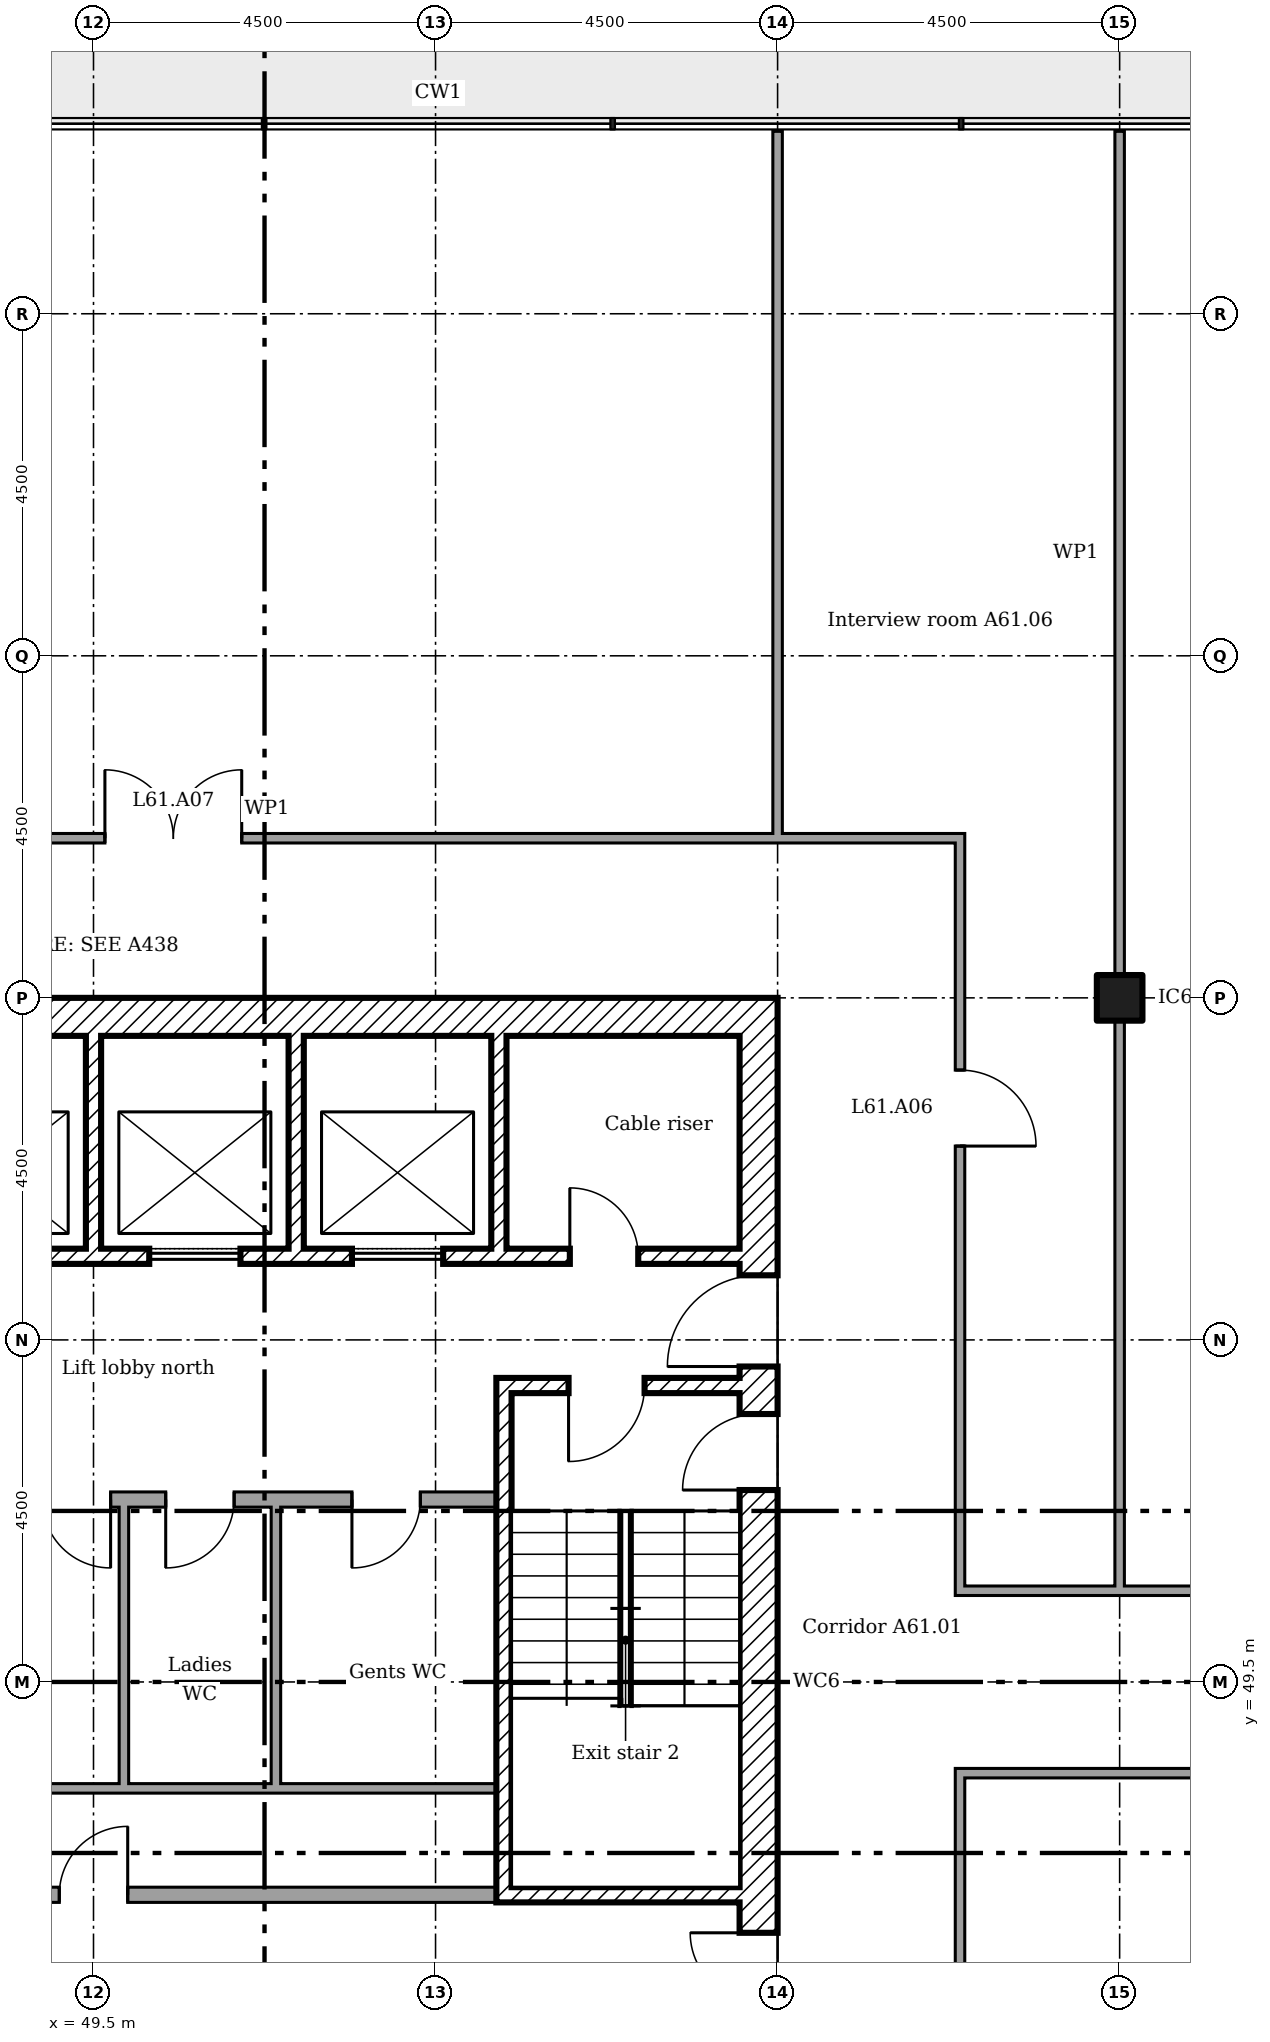
"""IFC4 building model, lengths in metres.
Left out: names, types, materials, properties, quantities, classifications, styles, units other than length and angle.
Written with IfcOpenShell. Run it as: python <this file> out.ifc"""

import sys

from ifc_helpers import new_model, si_unit, direction, frame, frame_2d, origin, origin_2d, place, context, subcontext, project, spatial, rectangle, extrude, element, fill, save


model = new_model("IFC4")
c1 = context("Model", 3, precision=1e-05, world=origin(), true_north=direction((0.0, 1.0)))
c2 = subcontext(c1, "Body", "Model", "MODEL_VIEW")
j1 = project(units=[si_unit("LENGTHUNIT", "METRE"), si_unit("PLANEANGLEUNIT", "RADIAN")], contexts=[c1])
p1 = place(None, origin())
s1 = spatial("IfcSite", under=j1, at=p1, CompositionType="ELEMENT")
p2 = place(p1, origin())
s2 = spatial("IfcBuilding", under=s1, at=p2, CompositionType="ELEMENT")
p3 = place(p2, frame((0.0, 0.0, 238.8)))
s3 = spatial("IfcBuildingStorey", under=s2, at=p3, CompositionType="ELEMENT", Elevation=238.8)
p4 = place(p3, frame((63.0, 58.5, 0.0)))
e1 = element("IfcColumn", 1, at=p4, inside=s3, PredefinedType="COLUMN", context=c2, shape_type="SweptSolid", body=[
    extrude(rectangle(XDim=0.6, YDim=0.6, at=origin_2d()), origin(), (0.0, 0.0, 1.0), 3.6),
])
p5 = place(p3, frame((58.25, 40.5, 0.0), z_axis=(0.0, 0.0, 1.0), x_axis=(0.0, 1.0, 0.0)))
e2 = element("IfcWall", 2, at=p5, inside=s3, PredefinedType="SHEAR", context=c2, shape_type="SweptSolid", body=[
    extrude(rectangle(XDim=18.0, YDim=0.5, at=frame_2d((9.0, 0.0))), origin(), (0.0, 0.0, 1.0), 3.35),
])
p6 = place(p5, frame((13.15, 0.0, 0.0)))
e3 = element("IfcOpeningElement", 3, at=p6, cuts=e2, PredefinedType="OPENING", context=c2, shape_type="SweptSolid", body=[
    extrude(rectangle(XDim=1.2, YDim=2.1, at=frame_2d((0.6, 1.05))), frame((0.0, 0.26, 0.0), z_axis=(0.0, -1.0, 0.0), x_axis=(1.0, 0.0, 0.0)), (0.0, 0.0, 1.0), 0.52),
])
p7 = place(p5, frame((3.9, 0.0, 0.0)))
e4 = element("IfcOpeningElement", 4, at=p7, cuts=e2, PredefinedType="OPENING", context=c2, shape_type="SweptSolid", body=[
    extrude(rectangle(XDim=1.8, YDim=2.1, at=frame_2d((0.9, 1.05))), frame((0.0, 0.26, 0.0), z_axis=(0.0, -1.0, 0.0), x_axis=(1.0, 0.0, 0.0)), (0.0, 0.0, 1.0), 0.52),
])
p8 = place(p5, frame((11.525, 0.0, 0.0)))
e5 = element("IfcOpeningElement", 5, at=p8, cuts=e2, PredefinedType="OPENING", context=c2, shape_type="SweptSolid", body=[
    extrude(rectangle(XDim=1.0, YDim=2.1, at=frame_2d((0.5, 1.05))), frame((0.0, 0.26, 0.0), z_axis=(0.0, -1.0, 0.0), x_axis=(1.0, 0.0, 0.0)), (0.0, 0.0, 1.0), 0.52),
])
p9 = place(p3, frame((40.5, 58.25, 0.0)))
e6 = element("IfcWall", 6, at=p9, inside=s3, PredefinedType="SHEAR", context=c2, shape_type="SweptSolid", body=[
    extrude(rectangle(XDim=17.5, YDim=0.5, at=frame_2d((8.75, 0.0))), origin(), (0.0, 0.0, 1.0), 3.35),
])
for number, where, z_axis, x_axis in (
    (7, (49.5, 58.0, 0.0), (0.0, 0.0, 1.0), (0.0, -1.0, 0.0)),
    (8, (52.167, 58.0, 0.0), (0.0, 0.0, 1.0), (0.0, -1.0, 0.0)),
    (9, (54.833, 58.0, 0.0), (0.0, 0.0, 1.0), (0.0, -1.0, 0.0)),
):
    element("IfcWall", number, at=place(p3, frame(where, z_axis=z_axis, x_axis=x_axis)), inside=s3, PredefinedType="SHEAR", context=c2, shape_type="SweptSolid", body=[
        extrude(rectangle(XDim=2.8, YDim=0.2, at=frame_2d((1.4, 0.0))), origin(), (0.0, 0.0, 1.0), 3.35),
    ])
p10 = place(p3, frame((46.933, 55.1, 0.0)))
e10 = element("IfcWall", 10, at=p10, inside=s3, PredefinedType="SHEAR", context=c2, shape_type="SweptSolid", body=[
    extrude(rectangle(XDim=11.067, YDim=0.2, at=frame_2d((5.533, 0.0))), origin(), (0.0, 0.0, 1.0), 3.35),
])
p11 = place(p10, frame((8.833, 0.0, 0.0)))
e11 = element("IfcOpeningElement", 11, at=p11, cuts=e10, PredefinedType="OPENING", context=c2, shape_type="SweptSolid", body=[
    extrude(rectangle(XDim=0.9, YDim=2.1, at=frame_2d((0.45, 1.05))), frame((0.0, 0.11, 0.0), z_axis=(0.0, -1.0, 0.0), x_axis=(1.0, 0.0, 0.0)), (0.0, 0.0, 1.0), 0.22),
])
p12 = place(p10, frame((0.633, 0.0, 0.0)))
e12 = element("IfcOpeningElement", 12, at=p12, cuts=e10, PredefinedType="OPENING", context=c2, shape_type="SweptSolid", body=[
    extrude(rectangle(XDim=1.2, YDim=2.1, at=frame_2d((0.6, 1.05))), frame((0.0, 0.11, 0.0), z_axis=(0.0, -1.0, 0.0), x_axis=(1.0, 0.0, 0.0)), (0.0, 0.0, 1.0), 0.22),
])
p13 = place(p10, frame((3.3, 0.0, 0.0)))
e13 = element("IfcOpeningElement", 13, at=p13, cuts=e10, PredefinedType="OPENING", context=c2, shape_type="SweptSolid", body=[
    extrude(rectangle(XDim=1.2, YDim=2.1, at=frame_2d((0.6, 1.05))), frame((0.0, 0.11, 0.0), z_axis=(0.0, -1.0, 0.0), x_axis=(1.0, 0.0, 0.0)), (0.0, 0.0, 1.0), 0.22),
])
p14 = place(p10, frame((5.967, 0.0, 0.0)))
e14 = element("IfcOpeningElement", 14, at=p14, cuts=e10, PredefinedType="OPENING", context=c2, shape_type="SweptSolid", body=[
    extrude(rectangle(XDim=1.2, YDim=2.1, at=frame_2d((0.6, 1.05))), frame((0.0, 0.11, 0.0), z_axis=(0.0, -1.0, 0.0), x_axis=(1.0, 0.0, 0.0)), (0.0, 0.0, 1.0), 0.22),
])
p15 = place(p3, frame((54.8, 53.4, 0.0)))
e15 = element("IfcWall", 15, at=p15, inside=s3, PredefinedType="SHEAR", context=c2, shape_type="SweptSolid", body=[
    extrude(rectangle(XDim=3.2, YDim=0.2, at=frame_2d((1.6, 0.0))), origin(), (0.0, 0.0, 1.0), 3.35),
])
p16 = place(p15, frame((0.95, 0.0, 0.0)))
e16 = element("IfcOpeningElement", 16, at=p16, cuts=e15, PredefinedType="OPENING", context=c2, shape_type="SweptSolid", body=[
    extrude(rectangle(XDim=1.0, YDim=2.1, at=frame_2d((0.5, 1.05))), frame((0.0, 0.11, 0.0), z_axis=(0.0, -1.0, 0.0), x_axis=(1.0, 0.0, 0.0)), (0.0, 0.0, 1.0), 0.22),
])
p17 = place(p3, frame((54.8, 46.7, 0.0)))
e17 = element("IfcWall", 17, at=p17, inside=s3, PredefinedType="SHEAR", context=c2, shape_type="SweptSolid", body=[
    extrude(rectangle(XDim=3.2, YDim=0.2, at=frame_2d((1.6, 0.0))), origin(), (0.0, 0.0, 1.0), 3.35),
])
p18 = place(p3, frame((54.9, 46.8, 0.0), z_axis=(0.0, 0.0, 1.0), x_axis=(0.0, 1.0, 0.0)))
e18 = element("IfcWall", 18, at=p18, inside=s3, PredefinedType="SHEAR", context=c2, shape_type="SweptSolid", body=[
    extrude(rectangle(XDim=6.5, YDim=0.2, at=frame_2d((3.25, 0.0))), origin(), (0.0, 0.0, 1.0), 3.35),
])
p19 = place(p3, frame((44.2, 51.9, 0.0)))
e19 = element("IfcWall", 19, at=p19, inside=s3, PredefinedType="PARTITIONING", context=c2, shape_type="SweptSolid", body=[
    extrude(rectangle(XDim=10.6, YDim=0.2, at=frame_2d((5.3, 0.0))), origin(), (0.0, 0.0, 1.0), 3.35),
])
p20 = place(p19, frame((4.625, 0.0, 0.0)))
e20 = element("IfcOpeningElement", 20, at=p20, cuts=e19, PredefinedType="OPENING", context=c2, shape_type="SweptSolid", body=[
    extrude(rectangle(XDim=0.9, YDim=2.1, at=frame_2d((0.45, 1.05))), frame((0.0, 0.11, 0.0), z_axis=(0.0, -1.0, 0.0), x_axis=(1.0, 0.0, 0.0)), (0.0, 0.0, 1.0), 0.22),
])
p21 = place(p19, frame((6.25, 0.0, 0.0)))
e21 = element("IfcOpeningElement", 21, at=p21, cuts=e19, PredefinedType="OPENING", context=c2, shape_type="SweptSolid", body=[
    extrude(rectangle(XDim=0.9, YDim=2.1, at=frame_2d((0.45, 1.05))), frame((0.0, 0.11, 0.0), z_axis=(0.0, -1.0, 0.0), x_axis=(1.0, 0.0, 0.0)), (0.0, 0.0, 1.0), 0.22),
])
p22 = place(p19, frame((8.7, 0.0, 0.0)))
e22 = element("IfcOpeningElement", 22, at=p22, cuts=e19, PredefinedType="OPENING", context=c2, shape_type="SweptSolid", body=[
    extrude(rectangle(XDim=0.9, YDim=2.1, at=frame_2d((0.45, 1.05))), frame((0.0, 0.11, 0.0), z_axis=(0.0, -1.0, 0.0), x_axis=(1.0, 0.0, 0.0)), (0.0, 0.0, 1.0), 0.22),
])
p23 = place(p3, frame((44.2, 46.7, 0.0)))
e23 = element("IfcWall", 23, at=p23, inside=s3, PredefinedType="PARTITIONING", context=c2, shape_type="SweptSolid", body=[
    extrude(rectangle(XDim=10.6, YDim=0.2, at=frame_2d((5.3, 0.0))), origin(), (0.0, 0.0, 1.0), 3.35),
])
p24 = place(p23, frame((4.85, 0.0, 0.0)))
e24 = element("IfcOpeningElement", 24, at=p24, cuts=e23, PredefinedType="OPENING", context=c2, shape_type="SweptSolid", body=[
    extrude(rectangle(XDim=0.9, YDim=2.1, at=frame_2d((0.45, 1.05))), frame((0.0, 0.11, 0.0), z_axis=(0.0, -1.0, 0.0), x_axis=(1.0, 0.0, 0.0)), (0.0, 0.0, 1.0), 0.22),
])
p25 = place(p3, frame((49.962, 48.1, 0.0), z_axis=(0.0, 0.0, 1.0), x_axis=(-1.0, 0.0, 0.0)))
e25 = element("IfcWall", 25, at=p25, inside=s3, PredefinedType="PARTITIONING", context=c2, shape_type="SweptSolid", body=[
    extrude(rectangle(XDim=5.762, YDim=0.125, at=frame_2d((2.881, 0.0))), origin(), (0.0, 0.0, 1.0), 3.35),
])
p26 = place(p3, frame((51.962, 48.1, 0.0), z_axis=(0.0, 0.0, 1.0), x_axis=(-1.0, 0.0, 0.0)))
e26 = element("IfcWall", 26, at=p26, inside=s3, PredefinedType="PARTITIONING", context=c2, shape_type="SweptSolid", body=[
    extrude(rectangle(XDim=2.062, YDim=0.125, at=frame_2d((1.031, 0.0))), origin(), (0.0, 0.0, 1.0), 3.35),
])
p27 = place(p3, frame((49.9, 48.163, 0.0), z_axis=(0.0, 0.0, 1.0), x_axis=(0.0, 1.0, 0.0)))
e27 = element("IfcWall", 27, at=p27, inside=s3, PredefinedType="PARTITIONING", context=c2, shape_type="SweptSolid", body=[
    extrude(rectangle(XDim=3.637, YDim=0.125, at=frame_2d((1.819, 0.0))), origin(), (0.0, 0.0, 1.0), 3.35),
])
p28 = place(p3, frame((54.8, 48.1, 0.0), z_axis=(0.0, 0.0, 1.0), x_axis=(-1.0, 0.0, 0.0)))
e28 = element("IfcWall", 28, at=p28, inside=s3, PredefinedType="PARTITIONING", context=c2, shape_type="SweptSolid", body=[
    extrude(rectangle(XDim=2.9, YDim=0.125, at=frame_2d((1.45, 0.0))), origin(), (0.0, 0.0, 1.0), 3.35),
])
p29 = place(p3, frame((51.9, 48.163, 0.0), z_axis=(0.0, 0.0, 1.0), x_axis=(0.0, 1.0, 0.0)))
e29 = element("IfcWall", 29, at=p29, inside=s3, PredefinedType="PARTITIONING", context=c2, shape_type="SweptSolid", body=[
    extrude(rectangle(XDim=3.637, YDim=0.125, at=frame_2d((1.819, 0.0))), origin(), (0.0, 0.0, 1.0), 3.35),
])
p30 = place(p3, frame((60.837, 48.3, 0.0)))
e30 = element("IfcWall", 30, at=p30, inside=s3, PredefinedType="PARTITIONING", context=c2, shape_type="SweptSolid", body=[
    extrude(rectangle(XDim=9.062, YDim=0.125, at=frame_2d((4.531, 0.0))), origin(), (0.0, 0.0, 1.0), 3.45),
])
p31 = place(p30, frame((4.062, 0.0, 0.0)))
e31 = element("IfcOpeningElement", 31, at=p31, cuts=e30, PredefinedType="OPENING", context=c2, shape_type="SweptSolid", body=[
    extrude(rectangle(XDim=1.0, YDim=2.1, at=frame_2d((0.5, 1.05))), frame((0.0, 0.073, 0.0), z_axis=(0.0, -1.0, 0.0), x_axis=(1.0, 0.0, 0.0)), (0.0, 0.0, 1.0), 0.145),
])
p32 = place(p3, frame((60.837, 50.7, 0.0)))
e32 = element("IfcWall", 32, at=p32, inside=s3, PredefinedType="PARTITIONING", context=c2, shape_type="SweptSolid", body=[
    extrude(rectangle(XDim=9.062, YDim=0.125, at=frame_2d((4.531, 0.0))), origin(), (0.0, 0.0, 1.0), 3.45),
])
p33 = place(p32, frame((3.978, 0.0, 0.0)))
e33 = element("IfcOpeningElement", 33, at=p33, cuts=e32, PredefinedType="OPENING", context=c2, shape_type="SweptSolid", body=[
    extrude(rectangle(XDim=1.8, YDim=2.1, at=frame_2d((0.9, 1.05))), frame((0.0, 0.073, 0.0), z_axis=(0.0, -1.0, 0.0), x_axis=(1.0, 0.0, 0.0)), (0.0, 0.0, 1.0), 0.145),
])
p34 = place(p3, frame((42.6, 60.6, 0.0)))
e34 = element("IfcWall", 34, at=p34, inside=s3, PredefinedType="PARTITIONING", context=c2, shape_type="SweptSolid", body=[
    extrude(rectangle(XDim=18.362, YDim=0.125, at=frame_2d((9.181, 0.0))), origin(), (0.0, 0.0, 1.0), 3.45),
])
p35 = place(p34, frame((7.05, 0.0, 0.0)))
e35 = element("IfcOpeningElement", 35, at=p35, cuts=e34, PredefinedType="OPENING", context=c2, shape_type="SweptSolid", body=[
    extrude(rectangle(XDim=1.8, YDim=2.1, at=frame_2d((0.9, 1.05))), frame((0.0, 0.073, 0.0), z_axis=(0.0, -1.0, 0.0), x_axis=(1.0, 0.0, 0.0)), (0.0, 0.0, 1.0), 0.145),
])
p36 = place(p3, frame((58.5, 60.6, 0.0), z_axis=(0.0, 0.0, 1.0), x_axis=(0.0, 1.0, 0.0)))
e36 = element("IfcWall", 36, at=p36, inside=s3, PredefinedType="PARTITIONING", context=c2, shape_type="SweptSolid", body=[
    extrude(rectangle(XDim=9.3, YDim=0.125, at=frame_2d((4.65, 0.0))), origin(), (0.0, 0.0, 1.0), 2.772),
])
p37 = place(p3, frame((60.9, 38.762, 0.0), z_axis=(0.0, 0.0, 1.0), x_axis=(0.0, 1.0, 0.0)))
e37 = element("IfcWall", 37, at=p37, inside=s3, PredefinedType="PARTITIONING", context=c2, shape_type="SweptSolid", body=[
    extrude(rectangle(XDim=9.475, YDim=0.125, at=frame_2d((4.738, 0.0))), origin(), (0.0, 0.0, 1.0), 3.45),
])
p38 = place(p3, frame((60.9, 50.762, 0.0), z_axis=(0.0, 0.0, 1.0), x_axis=(0.0, 1.0, 0.0)))
e38 = element("IfcWall", 38, at=p38, inside=s3, PredefinedType="PARTITIONING", context=c2, shape_type="SweptSolid", body=[
    extrude(rectangle(XDim=9.775, YDim=0.125, at=frame_2d((4.888, 0.0))), origin(), (0.0, 0.0, 1.0), 3.45),
])
p39 = place(p38, frame((5.788, 0.0, 0.0)))
e39 = element("IfcOpeningElement", 39, at=p39, cuts=e38, PredefinedType="OPENING", context=c2, shape_type="SweptSolid", body=[
    extrude(rectangle(XDim=1.0, YDim=2.1, at=frame_2d((0.5, 1.05))), frame((0.0, 0.073, 0.0), z_axis=(0.0, -1.0, 0.0), x_axis=(1.0, 0.0, 0.0)), (0.0, 0.0, 1.0), 0.145),
])
p40 = place(p3, frame((63.0, 50.7, 0.0), z_axis=(0.0, 0.0, 1.0), x_axis=(0.0, 1.0, 0.0)))
e40 = element("IfcWall", 40, at=p40, inside=s3, PredefinedType="PARTITIONING", context=c2, shape_type="SweptSolid", body=[
    extrude(rectangle(XDim=7.5, YDim=0.125, at=frame_2d((3.75, 0.0))), origin(), (0.0, 0.0, 1.0), 3.45),
])
p41 = place(p3, frame((63.0, 58.8, 0.0), z_axis=(0.0, 0.0, 1.0), x_axis=(0.0, 1.0, 0.0)))
e41 = element("IfcWall", 41, at=p41, inside=s3, PredefinedType="PARTITIONING", context=c2, shape_type="SweptSolid", body=[
    extrude(rectangle(XDim=11.1, YDim=0.125, at=frame_2d((5.55, 0.0))), origin(), (0.0, 0.0, 1.0), 2.772),
])
p42 = place(p6, origin())
e42 = element("IfcDoor", 42, at=p42, inside=s3, OperationType="SINGLE_SWING_RIGHT", PredefinedType="DOOR", context=c2, shape_type="SweptSolid", body=[
    extrude(rectangle(XDim=1.2, YDim=2.1, at=frame_2d((0.6, 1.05))), frame((0.0, 0.025, 0.0), z_axis=(0.0, -1.0, 0.0), x_axis=(1.0, 0.0, 0.0)), (0.0, 0.0, 1.0), 0.05),
])
fill(e3, e42)
p43 = place(p7, origin())
e43 = element("IfcDoor", 43, at=p43, inside=s3, OperationType="DOUBLE_DOOR_SINGLE_SWING", PredefinedType="DOOR", context=c2, shape_type="SweptSolid", body=[
    extrude(rectangle(XDim=1.8, YDim=2.1, at=frame_2d((0.9, 1.05))), frame((0.0, 0.025, 0.0), z_axis=(0.0, -1.0, 0.0), x_axis=(1.0, 0.0, 0.0)), (0.0, 0.0, 1.0), 0.05),
])
fill(e4, e43)
p44 = place(p16, frame((1.0, 0.0, 0.0), x_axis=(-1.0, 0.0, 0.0)))
e44 = element("IfcDoor", 44, at=p44, inside=s3, OperationType="SINGLE_SWING_LEFT", PredefinedType="DOOR", context=c2, shape_type="SweptSolid", body=[
    extrude(rectangle(XDim=1.0, YDim=2.1, at=frame_2d((0.5, 1.05))), frame((0.0, 0.025, 0.0), z_axis=(0.0, -1.0, 0.0), x_axis=(1.0, 0.0, 0.0)), (0.0, 0.0, 1.0), 0.05),
])
fill(e16, e44)
p45 = place(p8, origin())
e45 = element("IfcDoor", 45, at=p45, inside=s3, OperationType="SINGLE_SWING_RIGHT", PredefinedType="DOOR", context=c2, shape_type="SweptSolid", body=[
    extrude(rectangle(XDim=1.0, YDim=2.1, at=frame_2d((0.5, 1.05))), frame((0.0, 0.025, 0.0), z_axis=(0.0, -1.0, 0.0), x_axis=(1.0, 0.0, 0.0)), (0.0, 0.0, 1.0), 0.05),
])
fill(e5, e45)
p46 = place(p11, origin())
e46 = element("IfcDoor", 46, at=p46, inside=s3, OperationType="SINGLE_SWING_RIGHT", PredefinedType="DOOR", context=c2, shape_type="SweptSolid", body=[
    extrude(rectangle(XDim=0.9, YDim=2.1, at=frame_2d((0.45, 1.05))), frame((0.0, 0.025, 0.0), z_axis=(0.0, -1.0, 0.0), x_axis=(1.0, 0.0, 0.0)), (0.0, 0.0, 1.0), 0.05),
])
fill(e11, e46)
p47 = place(p24, origin())
e47 = element("IfcDoor", 47, at=p47, inside=s3, OperationType="SINGLE_SWING_LEFT", PredefinedType="DOOR", context=c2, shape_type="SweptSolid", body=[
    extrude(rectangle(XDim=0.9, YDim=2.1, at=frame_2d((0.45, 1.05))), frame((0.0, 0.025, 0.0), z_axis=(0.0, -1.0, 0.0), x_axis=(1.0, 0.0, 0.0)), (0.0, 0.0, 1.0), 0.05),
])
fill(e24, e47)
p48 = place(p20, frame((0.9, 0.0, 0.0), x_axis=(-1.0, 0.0, 0.0)))
e48 = element("IfcDoor", 48, at=p48, inside=s3, OperationType="SINGLE_SWING_RIGHT", PredefinedType="DOOR", context=c2, shape_type="SweptSolid", body=[
    extrude(rectangle(XDim=0.9, YDim=2.1, at=frame_2d((0.45, 1.05))), frame((0.0, 0.025, 0.0), z_axis=(0.0, -1.0, 0.0), x_axis=(1.0, 0.0, 0.0)), (0.0, 0.0, 1.0), 0.05),
])
fill(e20, e48)
p49 = place(p21, frame((0.9, 0.0, 0.0), x_axis=(-1.0, 0.0, 0.0)))
e49 = element("IfcDoor", 49, at=p49, inside=s3, OperationType="SINGLE_SWING_LEFT", PredefinedType="DOOR", context=c2, shape_type="SweptSolid", body=[
    extrude(rectangle(XDim=0.9, YDim=2.1, at=frame_2d((0.45, 1.05))), frame((0.0, 0.025, 0.0), z_axis=(0.0, -1.0, 0.0), x_axis=(1.0, 0.0, 0.0)), (0.0, 0.0, 1.0), 0.05),
])
fill(e21, e49)
p50 = place(p22, frame((0.9, 0.0, 0.0), x_axis=(-1.0, 0.0, 0.0)))
e50 = element("IfcDoor", 50, at=p50, inside=s3, OperationType="SINGLE_SWING_LEFT", PredefinedType="DOOR", context=c2, shape_type="SweptSolid", body=[
    extrude(rectangle(XDim=0.9, YDim=2.1, at=frame_2d((0.45, 1.05))), frame((0.0, 0.025, 0.0), z_axis=(0.0, -1.0, 0.0), x_axis=(1.0, 0.0, 0.0)), (0.0, 0.0, 1.0), 0.05),
])
fill(e22, e50)
p51 = place(p13, origin())
e51 = element("IfcDoor", 51, at=p51, inside=s3, OperationType="SLIDING_TO_LEFT", PredefinedType="DOOR", context=c2, shape_type="SweptSolid", body=[
    extrude(rectangle(XDim=1.2, YDim=2.1, at=frame_2d((0.6, 1.05))), frame((0.0, 0.025, 0.0), z_axis=(0.0, -1.0, 0.0), x_axis=(1.0, 0.0, 0.0)), (0.0, 0.0, 1.0), 0.05),
])
fill(e13, e51)
p52 = place(p14, origin())
e52 = element("IfcDoor", 52, at=p52, inside=s3, OperationType="SLIDING_TO_LEFT", PredefinedType="DOOR", context=c2, shape_type="SweptSolid", body=[
    extrude(rectangle(XDim=1.2, YDim=2.1, at=frame_2d((0.6, 1.05))), frame((0.0, 0.025, 0.0), z_axis=(0.0, -1.0, 0.0), x_axis=(1.0, 0.0, 0.0)), (0.0, 0.0, 1.0), 0.05),
])
fill(e14, e52)
p53 = place(p39, frame((1.0, 0.0, 0.0), x_axis=(-1.0, 0.0, 0.0)))
e53 = element("IfcDoor", 53, at=p53, inside=s3, OperationType="SINGLE_SWING_LEFT", PredefinedType="DOOR", context=c2, shape_type="SweptSolid", body=[
    extrude(rectangle(XDim=1.0, YDim=2.1, at=frame_2d((0.5, 1.05))), frame((0.0, 0.025, 0.0), z_axis=(0.0, -1.0, 0.0), x_axis=(1.0, 0.0, 0.0)), (0.0, 0.0, 1.0), 0.05),
])
fill(e39, e53)
p54 = place(p35, origin())
e54 = element("IfcDoor", 54, at=p54, inside=s3, OperationType="DOUBLE_DOOR_SINGLE_SWING", PredefinedType="DOOR", context=c2, shape_type="SweptSolid", body=[
    extrude(rectangle(XDim=1.8, YDim=2.1, at=frame_2d((0.9, 1.05))), frame((0.0, 0.025, 0.0), z_axis=(0.0, -1.0, 0.0), x_axis=(1.0, 0.0, 0.0)), (0.0, 0.0, 1.0), 0.05),
])
fill(e35, e54)
save(model, sys.argv[1])
